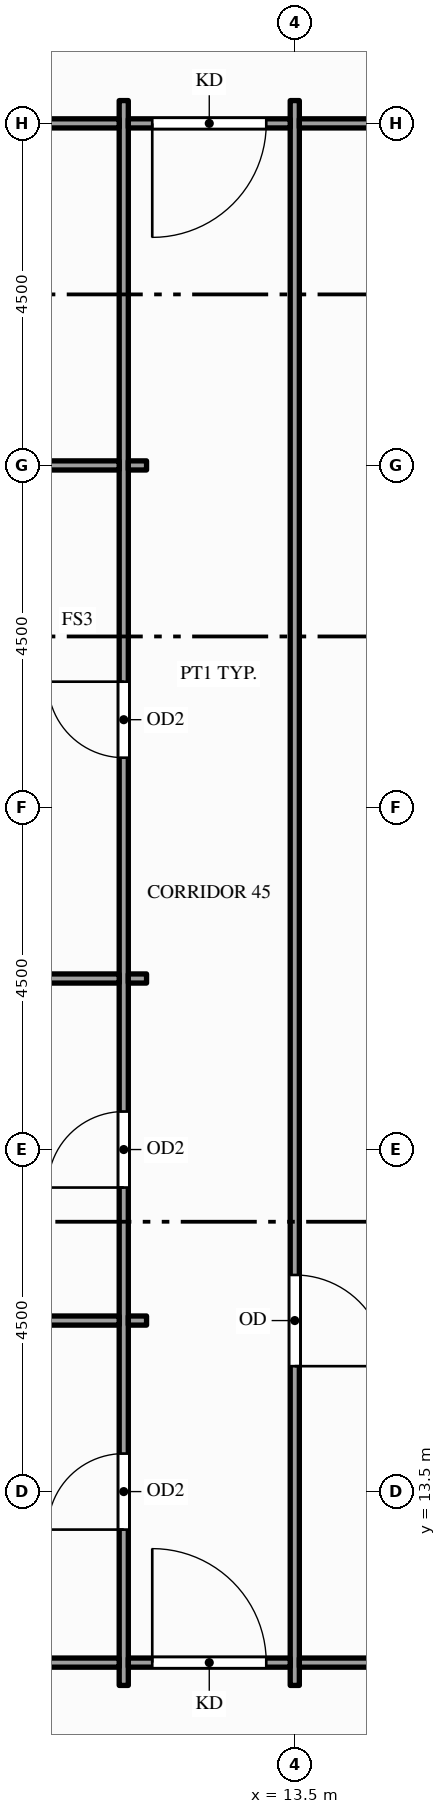
"""IFC4 building model, lengths in metres.
Left out: names, types, materials, properties, quantities, classifications, styles, units other than length and angle.
Written with IfcOpenShell. Run it as: python <this file> out.ifc"""

import sys

from ifc_helpers import new_model, si_unit, direction, frame, frame_2d, origin, place, context, subcontext, project, spatial, rectangle, extrude, element, fill, save


model = new_model("IFC4")
c1 = context("Model", 3, precision=1e-05, world=origin(), true_north=direction((0.0, 1.0)))
c2 = subcontext(c1, "Body", "Model", "MODEL_VIEW")
j1 = project(units=[si_unit("LENGTHUNIT", "METRE"), si_unit("PLANEANGLEUNIT", "RADIAN")], contexts=[c1])
p1 = place(None, origin())
s1 = spatial("IfcSite", under=j1, at=p1, CompositionType="ELEMENT")
p2 = place(p1, origin())
s2 = spatial("IfcBuilding", under=s1, at=p2, CompositionType="ELEMENT")
p3 = place(p2, frame((0.0, 0.0, 179.0)))
s3 = spatial("IfcBuildingStorey", under=s2, at=p3, CompositionType="ELEMENT", Elevation=179.0)
p4 = place(p3, frame((11.25, 10.95, 0.0), z_axis=(0.0, 0.0, 1.0), x_axis=(0.0, 1.0, 0.0)))
e1 = element("IfcWall", 1, at=p4, inside=s3, PredefinedType="PARTITIONING", context=c2, shape_type="SweptSolid", body=[
    extrude(rectangle(XDim=20.85, YDim=0.12, at=frame_2d((10.425, 0.0))), origin(), (0.0, 0.0, 1.0), 2.6),
])
p5 = place(p4, frame((2.05, 0.0, 0.0)))
e2 = element("IfcOpeningElement", 2, at=p5, cuts=e1, PredefinedType="OPENING", context=c2, shape_type="SweptSolid", body=[
    extrude(rectangle(XDim=1.0, YDim=2.1, at=frame_2d((0.5, 1.05))), frame((0.0, 0.07, 0.0), z_axis=(0.0, -1.0, 0.0), x_axis=(1.0, 0.0, 0.0)), (0.0, 0.0, 1.0), 0.14),
])
p6 = place(p4, frame((6.55, 0.0, 0.0)))
e3 = element("IfcOpeningElement", 3, at=p6, cuts=e1, PredefinedType="OPENING", context=c2, shape_type="SweptSolid", body=[
    extrude(rectangle(XDim=1.0, YDim=2.1, at=frame_2d((0.5, 1.05))), frame((0.0, 0.07, 0.0), z_axis=(0.0, -1.0, 0.0), x_axis=(1.0, 0.0, 0.0)), (0.0, 0.0, 1.0), 0.14),
])
p7 = place(p4, frame((12.205, 0.0, 0.0)))
e4 = element("IfcOpeningElement", 4, at=p7, cuts=e1, PredefinedType="OPENING", context=c2, shape_type="SweptSolid", body=[
    extrude(rectangle(XDim=1.0, YDim=2.1, at=frame_2d((0.5, 1.05))), frame((0.0, 0.07, 0.0), z_axis=(0.0, -1.0, 0.0), x_axis=(1.0, 0.0, 0.0)), (0.0, 0.0, 1.0), 0.14),
])
p8 = place(p3, frame((13.5, 10.95, 0.0), z_axis=(0.0, 0.0, 1.0), x_axis=(0.0, 1.0, 0.0)))
e5 = element("IfcWall", 5, at=p8, inside=s3, PredefinedType="PARTITIONING", context=c2, shape_type="SweptSolid", body=[
    extrude(rectangle(XDim=20.85, YDim=0.12, at=frame_2d((10.425, 0.0))), origin(), (0.0, 0.0, 1.0), 2.6),
])
p9 = place(p8, frame((4.2, 0.0, 0.0)))
e6 = element("IfcOpeningElement", 6, at=p9, cuts=e5, PredefinedType="OPENING", context=c2, shape_type="SweptSolid", body=[
    extrude(rectangle(XDim=1.2, YDim=2.1, at=frame_2d((0.6, 1.05))), frame((0.0, 0.07, 0.0), z_axis=(0.0, -1.0, 0.0), x_axis=(1.0, 0.0, 0.0)), (0.0, 0.0, 1.0), 0.14),
])
p10 = place(p3, frame((0.15, 11.25, 0.0), z_axis=(0.0, 0.0, 1.0), x_axis=(1.0, 0.0, 0.0)))
e7 = element("IfcWall", 7, at=p10, inside=s3, PredefinedType="PARTITIONING", context=c2, shape_type="SweptSolid", body=[
    extrude(rectangle(XDim=11.04, YDim=0.12, at=frame_2d((5.52, 0.0))), origin(), (0.0, 0.0, 1.0), 2.87),
])
p11 = place(p3, frame((11.31, 11.25, 0.0), z_axis=(0.0, 0.0, 1.0), x_axis=(1.0, 0.0, 0.0)))
e8 = element("IfcWall", 8, at=p11, inside=s3, PredefinedType="PARTITIONING", context=c2, shape_type="SweptSolid", body=[
    extrude(rectangle(XDim=2.13, YDim=0.12, at=frame_2d((1.065, 0.0))), origin(), (0.0, 0.0, 1.0), 2.87),
])
p12 = place(p11, frame((0.315, 0.0, 0.0)))
e9 = element("IfcOpeningElement", 9, at=p12, cuts=e8, PredefinedType="OPENING", context=c2, shape_type="SweptSolid", body=[
    extrude(rectangle(XDim=1.5, YDim=2.1, at=frame_2d((0.75, 1.05))), frame((0.0, 0.07, 0.0), z_axis=(0.0, -1.0, 0.0), x_axis=(1.0, 0.0, 0.0)), (0.0, 0.0, 1.0), 0.14),
])
p13 = place(p3, frame((13.56, 11.25, 0.0), z_axis=(0.0, 0.0, 1.0), x_axis=(1.0, 0.0, 0.0)))
e10 = element("IfcWall", 10, at=p13, inside=s3, PredefinedType="PARTITIONING", context=c2, shape_type="SweptSolid", body=[
    extrude(rectangle(XDim=13.38, YDim=0.12, at=frame_2d((6.69, 0.0))), origin(), (0.0, 0.0, 1.0), 2.87),
])
p14 = place(p13, frame((3.54, 0.0, 0.0)))
e11 = element("IfcOpeningElement", 11, at=p14, cuts=e10, PredefinedType="OPENING", context=c2, shape_type="SweptSolid", body=[
    extrude(rectangle(XDim=1.8, YDim=2.1, at=frame_2d((0.9, 1.05))), frame((0.0, 0.07, 0.0), z_axis=(0.0, -1.0, 0.0), x_axis=(1.0, 0.0, 0.0)), (0.0, 0.0, 1.0), 0.14),
])
p15 = place(p3, frame((0.15, 15.75, 0.0), z_axis=(0.0, 0.0, 1.0), x_axis=(1.0, 0.0, 0.0)))
e12 = element("IfcWall", 12, at=p15, inside=s3, PredefinedType="PARTITIONING", context=c2, shape_type="SweptSolid", body=[
    extrude(rectangle(XDim=11.04, YDim=0.12, at=frame_2d((5.52, 0.0))), origin(), (0.0, 0.0, 1.0), 2.87),
])
p16 = place(p3, frame((11.31, 15.75, 0.0), z_axis=(0.0, 0.0, 1.0), x_axis=(1.0, 0.0, 0.0)))
e13 = element("IfcWall", 13, at=p16, inside=s3, PredefinedType="PARTITIONING", context=c2, shape_type="SweptSolid", body=[
    extrude(rectangle(XDim=0.24, YDim=0.12, at=frame_2d((0.12, 0.0))), origin(), (0.0, 0.0, 1.0), 2.87),
])
p17 = place(p3, frame((0.15, 20.25, 0.0), z_axis=(0.0, 0.0, 1.0), x_axis=(1.0, 0.0, 0.0)))
e14 = element("IfcWall", 14, at=p17, inside=s3, PredefinedType="PARTITIONING", context=c2, shape_type="SweptSolid", body=[
    extrude(rectangle(XDim=11.04, YDim=0.12, at=frame_2d((5.52, 0.0))), origin(), (0.0, 0.0, 1.0), 2.87),
])
p18 = place(p3, frame((11.31, 20.25, 0.0), z_axis=(0.0, 0.0, 1.0), x_axis=(1.0, 0.0, 0.0)))
e15 = element("IfcWall", 15, at=p18, inside=s3, PredefinedType="PARTITIONING", context=c2, shape_type="SweptSolid", body=[
    extrude(rectangle(XDim=0.24, YDim=0.12, at=frame_2d((0.12, 0.0))), origin(), (0.0, 0.0, 1.0), 2.87),
])
p19 = place(p3, frame((7.06, 27.0, 0.0), z_axis=(0.0, 0.0, 1.0), x_axis=(1.0, 0.0, 0.0)))
e16 = element("IfcWall", 16, at=p19, inside=s3, PredefinedType="PARTITIONING", context=c2, shape_type="SweptSolid", body=[
    extrude(rectangle(XDim=4.13, YDim=0.12, at=frame_2d((2.065, 0.0))), origin(), (0.0, 0.0, 1.0), 2.87),
])
p20 = place(p3, frame((11.31, 27.0, 0.0), z_axis=(0.0, 0.0, 1.0), x_axis=(1.0, 0.0, 0.0)))
e17 = element("IfcWall", 17, at=p20, inside=s3, PredefinedType="PARTITIONING", context=c2, shape_type="SweptSolid", body=[
    extrude(rectangle(XDim=0.24, YDim=0.12, at=frame_2d((0.12, 0.0))), origin(), (0.0, 0.0, 1.0), 2.87),
])
p21 = place(p3, frame((7.06, 31.5, 0.0), z_axis=(0.0, 0.0, 1.0), x_axis=(1.0, 0.0, 0.0)))
e18 = element("IfcWall", 18, at=p21, inside=s3, PredefinedType="PARTITIONING", context=c2, shape_type="SweptSolid", body=[
    extrude(rectangle(XDim=4.13, YDim=0.12, at=frame_2d((2.065, 0.0))), origin(), (0.0, 0.0, 1.0), 2.87),
])
p22 = place(p21, frame((1.565, 0.0, 0.0)))
e19 = element("IfcOpeningElement", 19, at=p22, cuts=e18, PredefinedType="OPENING", context=c2, shape_type="SweptSolid", body=[
    extrude(rectangle(XDim=1.0, YDim=2.1, at=frame_2d((0.5, 1.05))), frame((0.0, 0.07, 0.0), z_axis=(0.0, -1.0, 0.0), x_axis=(1.0, 0.0, 0.0)), (0.0, 0.0, 1.0), 0.14),
])
p23 = place(p3, frame((11.31, 31.5, 0.0), z_axis=(0.0, 0.0, 1.0), x_axis=(1.0, 0.0, 0.0)))
e20 = element("IfcWall", 20, at=p23, inside=s3, PredefinedType="PARTITIONING", context=c2, shape_type="SweptSolid", body=[
    extrude(rectangle(XDim=2.13, YDim=0.12, at=frame_2d((1.065, 0.0))), origin(), (0.0, 0.0, 1.0), 2.87),
])
p24 = place(p23, frame((0.315, 0.0, 0.0)))
e21 = element("IfcOpeningElement", 21, at=p24, cuts=e20, PredefinedType="OPENING", context=c2, shape_type="SweptSolid", body=[
    extrude(rectangle(XDim=1.5, YDim=2.1, at=frame_2d((0.75, 1.05))), frame((0.0, 0.07, 0.0), z_axis=(0.0, -1.0, 0.0), x_axis=(1.0, 0.0, 0.0)), (0.0, 0.0, 1.0), 0.14),
])
p25 = place(p3, frame((13.56, 31.5, 0.0), z_axis=(0.0, 0.0, 1.0), x_axis=(1.0, 0.0, 0.0)))
e22 = element("IfcWall", 22, at=p25, inside=s3, PredefinedType="PARTITIONING", context=c2, shape_type="SweptSolid", body=[
    extrude(rectangle(XDim=7.29, YDim=0.12, at=frame_2d((3.645, 0.0))), origin(), (0.0, 0.0, 1.0), 2.87),
])
p26 = place(p12, origin())
e23 = element("IfcDoor", 23, at=p26, inside=s3, OperationType="SINGLE_SWING_LEFT", PredefinedType="DOOR", context=c2, shape_type="SweptSolid", body=[
    extrude(rectangle(XDim=1.5, YDim=2.1, at=frame_2d((0.75, 1.05))), frame((0.0, 0.025, 0.0), z_axis=(0.0, -1.0, 0.0), x_axis=(1.0, 0.0, 0.0)), (0.0, 0.0, 1.0), 0.05),
])
fill(e9, e23)
p27 = place(p24, origin())
e24 = element("IfcDoor", 24, at=p27, inside=s3, OperationType="SINGLE_SWING_LEFT", PredefinedType="DOOR", context=c2, shape_type="SweptSolid", body=[
    extrude(rectangle(XDim=1.5, YDim=2.1, at=frame_2d((0.75, 1.05))), frame((0.0, 0.025, 0.0), z_axis=(0.0, -1.0, 0.0), x_axis=(1.0, 0.0, 0.0)), (0.0, 0.0, 1.0), 0.05),
])
fill(e21, e24)
p28 = place(p5, origin())
e25 = element("IfcDoor", 25, at=p28, inside=s3, OperationType="SINGLE_SWING_LEFT", PredefinedType="DOOR", context=c2, shape_type="SweptSolid", body=[
    extrude(rectangle(XDim=1.0, YDim=2.1, at=frame_2d((0.5, 1.05))), frame((0.0, 0.025, 0.0), z_axis=(0.0, -1.0, 0.0), x_axis=(1.0, 0.0, 0.0)), (0.0, 0.0, 1.0), 0.05),
])
fill(e2, e25)
p29 = place(p6, origin())
e26 = element("IfcDoor", 26, at=p29, inside=s3, OperationType="SINGLE_SWING_LEFT", PredefinedType="DOOR", context=c2, shape_type="SweptSolid", body=[
    extrude(rectangle(XDim=1.0, YDim=2.1, at=frame_2d((0.5, 1.05))), frame((0.0, 0.025, 0.0), z_axis=(0.0, -1.0, 0.0), x_axis=(1.0, 0.0, 0.0)), (0.0, 0.0, 1.0), 0.05),
])
fill(e3, e26)
p30 = place(p7, origin())
e27 = element("IfcDoor", 27, at=p30, inside=s3, OperationType="SINGLE_SWING_RIGHT", PredefinedType="DOOR", context=c2, shape_type="SweptSolid", body=[
    extrude(rectangle(XDim=1.0, YDim=2.1, at=frame_2d((0.5, 1.05))), frame((0.0, 0.025, 0.0), z_axis=(0.0, -1.0, 0.0), x_axis=(1.0, 0.0, 0.0)), (0.0, 0.0, 1.0), 0.05),
])
fill(e4, e27)
p31 = place(p9, origin())
e28 = element("IfcDoor", 28, at=p31, inside=s3, OperationType="SINGLE_SWING_LEFT", PredefinedType="DOOR", context=c2, shape_type="SweptSolid", body=[
    extrude(rectangle(XDim=1.2, YDim=2.1, at=frame_2d((0.6, 1.05))), frame((0.0, 0.025, 0.0), z_axis=(0.0, -1.0, 0.0), x_axis=(1.0, 0.0, 0.0)), (0.0, 0.0, 1.0), 0.05),
])
fill(e6, e28)
save(model, sys.argv[1])
